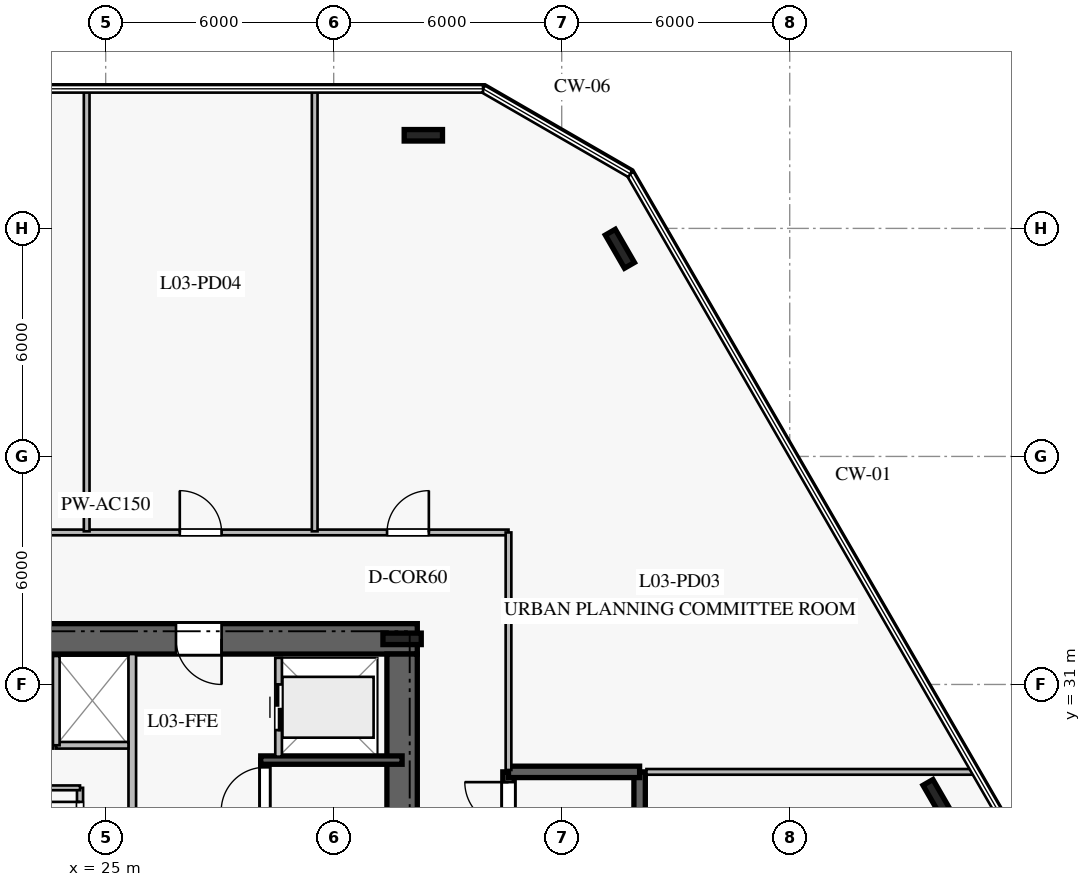
"""IFC4 building model, lengths in metres.
Left out: names, types, materials, properties, quantities, classifications, styles, units other than length and angle.
Written with IfcOpenShell. Run it as: python <this file> out.ifc"""

import sys

from ifc_helpers import new_model, si_unit, direction, frame, frame_2d, origin, origin_2d, place, context, subcontext, project, spatial, rectangle, i_section, extrude, element, fill, save


model = new_model("IFC4")
c1 = context("Model", 3, precision=1e-05, world=origin(), true_north=direction((0.0, 1.0)))
c2 = subcontext(c1, "Body", "Model", "MODEL_VIEW")
j1 = project(units=[si_unit("LENGTHUNIT", "METRE"), si_unit("PLANEANGLEUNIT", "RADIAN")], contexts=[c1])
p1 = place(None, origin())
s1 = spatial("IfcSite", under=j1, at=p1, CompositionType="ELEMENT")
p2 = place(p1, origin())
s2 = spatial("IfcBuilding", under=s1, at=p2, CompositionType="ELEMENT")
p3 = place(p2, frame((0.0, 0.0, 14.4)))
s3 = spatial("IfcBuildingStorey", under=s2, at=p3, CompositionType="ELEMENT", Elevation=14.4)
p4 = place(p3, frame((33.2, 32.2, 0.0), z_axis=(0.0, 0.0, 1.0), x_axis=(-1.0, 0.0, 0.0)))
e1 = element("IfcWall", 1, at=p4, inside=s3, PredefinedType="SHEAR", context=c2, shape_type="SweptSolid", body=[
    extrude(rectangle(XDim=16.4, YDim=0.8, at=frame_2d((8.2, 0.0))), origin(), (0.0, 0.0, 1.0), 4.3),
])
p5 = place(p4, frame((5.15, 0.0, 0.0)))
e2 = element("IfcOpeningElement", 2, at=p5, cuts=e1, PredefinedType="OPENING", context=c2, shape_type="SweptSolid", body=[
    extrude(rectangle(XDim=1.2, YDim=2.25, at=frame_2d((0.6, 1.125))), frame((0.0, 0.41, 0.0), z_axis=(0.0, -1.0, 0.0), x_axis=(1.0, 0.0, 0.0)), (0.0, 0.0, 1.0), 0.82),
])
p6 = place(p3, frame((32.8, 18.2, 0.0), z_axis=(0.0, 0.0, 1.0), x_axis=(0.0, 1.0, 0.0)))
e3 = element("IfcWall", 3, at=p6, inside=s3, PredefinedType="SHEAR", context=c2, shape_type="SweptSolid", body=[
    extrude(rectangle(XDim=13.6, YDim=0.8, at=frame_2d((6.8, 0.0))), origin(), (0.0, 0.0, 1.0), 4.3),
])
p7 = place(p3, frame((32.8, 32.2, 0.0), z_axis=(0.0, 0.0, 1.0), x_axis=(1.0, 0.0, 0.0)))
e4 = element("IfcColumn", 4, at=p7, inside=s3, PredefinedType="COLUMN", context=c2, shape_type="SweptSolid", body=[
    extrude(i_section(OverallWidth=0.302, OverallDepth=1.008, WebThickness=0.021, FlangeThickness=0.04, at=origin_2d()), origin(), (0.0, 0.0, 1.0), 4.6),
])
p8 = place(p3, frame((29.19, 21.79, 0.0), z_axis=(0.0, 0.0, 1.0), x_axis=(0.0, 1.0, 0.0)))
e5 = element("IfcWall", 5, at=p8, inside=s3, PredefinedType="SOLIDWALL", context=c2, shape_type="SweptSolid", body=[
    extrude(rectangle(XDim=7.22, YDim=0.22, at=frame_2d((3.61, 0.0))), origin(), (0.0, 0.0, 1.0), 4.3),
])
p9 = place(p8, frame((5.88, 0.0, 0.0)))
e6 = element("IfcOpeningElement", 6, at=p9, cuts=e5, PredefinedType="OPENING", context=c2, shape_type="SweptSolid", body=[
    extrude(rectangle(XDim=1.15, YDim=2.2, at=frame_2d((0.575, 1.1))), frame((0.0, 0.12, 0.0), z_axis=(0.0, -1.0, 0.0), x_axis=(1.0, 0.0, 0.0)), (0.0, 0.0, 1.0), 0.24),
])
p10 = place(p3, frame((29.08, 29.01, 0.0), z_axis=(0.0, 0.0, 1.0), x_axis=(1.0, 0.0, 0.0)))
e7 = element("IfcWall", 7, at=p10, inside=s3, PredefinedType="SOLIDWALL", context=c2, shape_type="SweptSolid", body=[
    extrude(rectangle(XDim=3.72, YDim=0.22, at=frame_2d((1.86, 0.0))), origin(), (0.0, 0.0, 1.0), 4.3),
])
p11 = place(p3, frame((35.6, 21.3, 0.0), z_axis=(0.0, 0.0, 1.0), x_axis=(0.0, 1.0, 0.0)))
e8 = element("IfcWall", 8, at=p11, inside=s3, PredefinedType="SOLIDWALL", context=c2, shape_type="SweptSolid", body=[
    extrude(rectangle(XDim=7.4, YDim=0.3, at=frame_2d((3.7, 0.0))), origin(), (0.0, 0.0, 1.0), 4.3),
])
p12 = place(p11, frame((5.98, 0.0, 0.0)))
e9 = element("IfcOpeningElement", 9, at=p12, cuts=e8, PredefinedType="OPENING", context=c2, shape_type="SweptSolid", body=[
    extrude(rectangle(XDim=1.15, YDim=2.2, at=frame_2d((0.575, 1.1))), frame((0.0, 0.16, 0.0), z_axis=(0.0, -1.0, 0.0), x_axis=(1.0, 0.0, 0.0)), (0.0, 0.0, 1.0), 0.32),
])
p13 = place(p3, frame((39.05, 21.3, 0.0), z_axis=(0.0, 0.0, 1.0), x_axis=(0.0, 1.0, 0.0)))
e10 = element("IfcWall", 10, at=p13, inside=s3, PredefinedType="SOLIDWALL", context=c2, shape_type="SweptSolid", body=[
    extrude(rectangle(XDim=7.4, YDim=0.3, at=frame_2d((3.7, 0.0))), origin(), (0.0, 0.0, 1.0), 4.3),
])
p14 = place(p3, frame((35.6, 28.7, 0.0), z_axis=(0.0, 0.0, 1.0), x_axis=(1.0, 0.0, 0.0)))
e11 = element("IfcWall", 11, at=p14, inside=s3, PredefinedType="SOLIDWALL", context=c2, shape_type="SweptSolid", body=[
    extrude(rectangle(XDim=3.45, YDim=0.3, at=frame_2d((1.725, 0.0))), origin(), (0.0, 0.0, 1.0), 4.3),
])
for number, where, z_axis, x_axis in (
    (12, (46.89, 27.986, 0.0), (0.0, 0.0, 1.0), (-0.5, 0.866, 0.0)),
    (13, (38.531, 42.464, 0.0), (0.0, 0.0, 1.0), (-0.5, 0.866, 0.0)),
    (14, (33.359, 45.45, 0.0), (0.0, 0.0, 1.0), (1.0, 0.0, 0.0)),
):
    element("IfcColumn", number, at=place(p3, frame(where, z_axis=z_axis, x_axis=x_axis)), inside=s3, PredefinedType="COLUMN", context=c2, shape_type="SweptSolid", body=[
        extrude(i_section(OverallWidth=0.302, OverallDepth=1.008, WebThickness=0.021, FlangeThickness=0.04, at=origin_2d()), origin(), (0.0, 0.0, 1.0), 4.6),
    ])
p15 = place(p3, frame((25.7, 26.65, 0.0), z_axis=(0.0, 0.0, 1.0), x_axis=(0.0, 1.0, 0.0)))
e15 = element("IfcWall", 15, at=p15, inside=s3, PredefinedType="PARTITIONING", context=c2, shape_type="SweptSolid", body=[
    extrude(rectangle(XDim=5.15, YDim=0.2, at=frame_2d((2.575, 0.0))), origin(), (0.0, 0.0, 1.0), 4.3),
])
p16 = place(p3, frame((24.325, 23.35, 0.0), z_axis=(0.0, 0.0, 1.0), x_axis=(0.0, 1.0, 0.0)))
e16 = element("IfcWall", 16, at=p16, inside=s3, PredefinedType="PLUMBINGWALL", context=c2, shape_type="SweptSolid", body=[
    extrude(rectangle(XDim=4.93, YDim=0.16, at=frame_2d((2.465, 0.0))), origin(), (0.0, 0.0, 1.0), 4.3),
])
p17 = place(p16, frame((0.375, 0.0, 0.0)))
e17 = element("IfcOpeningElement", 17, at=p17, cuts=e16, PredefinedType="OPENING", context=c2, shape_type="SweptSolid", body=[
    extrude(rectangle(XDim=0.95, YDim=2.1, at=frame_2d((0.475, 1.05))), frame((0.0, 0.09, 0.0), z_axis=(0.0, -1.0, 0.0), x_axis=(1.0, 0.0, 0.0)), (0.0, 0.0, 1.0), 0.18),
])
p18 = place(p16, frame((2.035, 0.0, 0.0)))
e18 = element("IfcOpeningElement", 18, at=p18, cuts=e16, PredefinedType="OPENING", context=c2, shape_type="SweptSolid", body=[
    extrude(rectangle(XDim=0.9, YDim=2.1, at=frame_2d((0.45, 1.05))), frame((0.0, 0.09, 0.0), z_axis=(0.0, -1.0, 0.0), x_axis=(1.0, 0.0, 0.0)), (0.0, 0.0, 1.0), 0.18),
])
p19 = place(p16, frame((3.66, 0.0, 0.0)))
e19 = element("IfcOpeningElement", 19, at=p19, cuts=e16, PredefinedType="OPENING", context=c2, shape_type="SweptSolid", body=[
    extrude(rectangle(XDim=0.9, YDim=2.1, at=frame_2d((0.45, 1.05))), frame((0.0, 0.09, 0.0), z_axis=(0.0, -1.0, 0.0), x_axis=(1.0, 0.0, 0.0)), (0.0, 0.0, 1.0), 0.18),
])
p20 = place(p3, frame((20.92, 28.28, 0.0), z_axis=(0.0, 0.0, 1.0), x_axis=(1.0, 0.0, 0.0)))
e20 = element("IfcWall", 20, at=p20, inside=s3, PredefinedType="PARTITIONING", context=c2, shape_type="SweptSolid", body=[
    extrude(rectangle(XDim=3.405, YDim=0.125, at=frame_2d((1.703, 0.0))), origin(), (0.0, 0.0, 1.0), 4.3),
])
p21 = place(p3, frame((21.725, 29.4, 0.0), z_axis=(0.0, 0.0, 1.0), x_axis=(1.0, 0.0, 0.0)))
e21 = element("IfcWall", 21, at=p21, inside=s3, PredefinedType="PARTITIONING", context=c2, shape_type="SweptSolid", body=[
    extrude(rectangle(XDim=1.9, YDim=0.175, at=frame_2d((0.95, 0.0))), origin(), (0.0, 0.0, 1.0), 4.3),
])
p22 = place(p3, frame((23.7, 29.4, 0.0), z_axis=(0.0, 0.0, 1.0), x_axis=(1.0, 0.0, 0.0)))
e22 = element("IfcWall", 22, at=p22, inside=s3, PredefinedType="PARTITIONING", context=c2, shape_type="SweptSolid", body=[
    extrude(rectangle(XDim=1.9, YDim=0.175, at=frame_2d((0.95, 0.0))), origin(), (0.0, 0.0, 1.0), 4.3),
])
p23 = place(p3, frame((23.7, 29.4, 0.0), z_axis=(0.0, 0.0, 1.0), x_axis=(0.0, 1.0, 0.0)))
e23 = element("IfcWall", 23, at=p23, inside=s3, PredefinedType="PARTITIONING", context=c2, shape_type="SweptSolid", body=[
    extrude(rectangle(XDim=2.35, YDim=0.175, at=frame_2d((1.175, 0.0))), origin(), (0.0, 0.0, 1.0), 4.3),
])
p24 = place(p3, frame((29.55, 29.1, 0.0), z_axis=(0.0, 0.0, 1.0), x_axis=(0.0, 1.0, 0.0)))
e24 = element("IfcWall", 24, at=p24, inside=s3, PredefinedType="PARTITIONING", context=c2, shape_type="SweptSolid", body=[
    extrude(rectangle(XDim=2.6, YDim=0.175, at=frame_2d((1.3, 0.0))), origin(), (0.0, 0.0, 1.0), 4.3),
])
p25 = place(p24, frame((0.7, 0.0, 0.0)))
e25 = element("IfcOpeningElement", 25, at=p25, cuts=e24, PredefinedType="OPENING", context=c2, shape_type="SweptSolid", body=[
    extrude(rectangle(XDim=1.2, YDim=2.2, at=frame_2d((0.6, 1.1))), frame((0.0, 0.098, 0.0), z_axis=(0.0, -1.0, 0.0), x_axis=(1.0, 0.0, 0.0)), (0.0, 0.0, 1.0), 0.195),
])
p26 = place(p3, frame((14.4, 35.0, 0.0), z_axis=(0.0, 0.0, 1.0), x_axis=(1.0, 0.0, 0.0)))
e26 = element("IfcWall", 26, at=p26, inside=s3, PredefinedType="PARTITIONING", context=c2, shape_type="SweptSolid", body=[
    extrude(rectangle(XDim=21.2, YDim=0.15, at=frame_2d((10.6, 0.0))), origin(), (0.0, 0.0, 1.0), 3.75),
])
p27 = place(p26, frame((2.12, 0.0, 0.0)))
e27 = element("IfcOpeningElement", 27, at=p27, cuts=e26, PredefinedType="OPENING", context=c2, shape_type="SweptSolid", body=[
    extrude(rectangle(XDim=0.95, YDim=2.1, at=frame_2d((0.475, 1.05))), frame((0.0, 0.085, 0.0), z_axis=(0.0, -1.0, 0.0), x_axis=(1.0, 0.0, 0.0)), (0.0, 0.0, 1.0), 0.17),
])
p28 = place(p26, frame((7.088, 0.0, 0.0)))
e28 = element("IfcOpeningElement", 28, at=p28, cuts=e26, PredefinedType="OPENING", context=c2, shape_type="SweptSolid", body=[
    extrude(rectangle(XDim=1.1, YDim=2.2, at=frame_2d((0.55, 1.1))), frame((0.0, 0.085, 0.0), z_axis=(0.0, -1.0, 0.0), x_axis=(1.0, 0.0, 0.0)), (0.0, 0.0, 1.0), 0.17),
])
p29 = place(p26, frame((18.004, 0.0, 0.0)))
e29 = element("IfcOpeningElement", 29, at=p29, cuts=e26, PredefinedType="OPENING", context=c2, shape_type="SweptSolid", body=[
    extrude(rectangle(XDim=1.1, YDim=2.2, at=frame_2d((0.55, 1.1))), frame((0.0, 0.085, 0.0), z_axis=(0.0, -1.0, 0.0), x_axis=(1.0, 0.0, 0.0)), (0.0, 0.0, 1.0), 0.17),
])
p30 = place(p26, frame((12.55, 0.0, 0.0)))
e30 = element("IfcOpeningElement", 30, at=p30, cuts=e26, PredefinedType="OPENING", context=c2, shape_type="SweptSolid", body=[
    extrude(rectangle(XDim=1.1, YDim=2.2, at=frame_2d((0.55, 1.1))), frame((0.0, 0.085, 0.0), z_axis=(0.0, -1.0, 0.0), x_axis=(1.0, 0.0, 0.0)), (0.0, 0.0, 1.0), 0.17),
])
p31 = place(p3, frame((35.6, 28.75, 0.0), z_axis=(0.0, 0.0, 1.0), x_axis=(0.0, 1.0, 0.0)))
e31 = element("IfcWall", 31, at=p31, inside=s3, PredefinedType="PARTITIONING", context=c2, shape_type="SweptSolid", body=[
    extrude(rectangle(XDim=6.25, YDim=0.15, at=frame_2d((3.125, 0.0))), origin(), (0.0, 0.0, 1.0), 3.75),
])
p32 = place(p3, frame((39.23, 28.7, 0.0), z_axis=(0.0, 0.0, 1.0), x_axis=(1.0, 0.0, 0.0)))
e32 = element("IfcWall", 32, at=p32, inside=s3, PredefinedType="PARTITIONING", context=c2, shape_type="SweptSolid", body=[
    extrude(rectangle(XDim=8.69, YDim=0.15, at=frame_2d((4.345, 0.0))), origin(), (0.0, 0.0, 1.0), 3.6),
])
for number, where, z_axis, x_axis in (
    (33, (24.5, 35.03, 0.0), (0.0, 0.0, 1.0), (0.0, 1.0, 0.0)),
    (34, (30.5, 35.03, 0.0), (0.0, 0.0, 1.0), (0.0, 1.0, 0.0)),
):
    element("IfcWall", number, at=place(p3, frame(where, z_axis=z_axis, x_axis=x_axis)), inside=s3, PredefinedType="PARTITIONING", context=c2, shape_type="SweptSolid", body=[
        extrude(rectangle(XDim=11.67, YDim=0.15, at=frame_2d((5.835, 0.0))), origin(), (0.0, 0.0, 1.0), 3.6),
    ])
p33 = place(p9, origin())
e35 = element("IfcDoor", 35, at=p33, inside=s3, OperationType="SINGLE_SWING_LEFT", PredefinedType="DOOR", context=c2, shape_type="SweptSolid", body=[
    extrude(rectangle(XDim=1.15, YDim=2.2, at=frame_2d((0.575, 1.1))), frame((0.0, 0.025, 0.0), z_axis=(0.0, -1.0, 0.0), x_axis=(1.0, 0.0, 0.0)), (0.0, 0.0, 1.0), 0.05),
])
fill(e6, e35)
p34 = place(p5, origin())
e36 = element("IfcDoor", 36, at=p34, inside=s3, OperationType="SINGLE_SWING_LEFT", PredefinedType="DOOR", context=c2, shape_type="SweptSolid", body=[
    extrude(rectangle(XDim=1.2, YDim=2.25, at=frame_2d((0.6, 1.125))), frame((0.0, 0.025, 0.0), z_axis=(0.0, -1.0, 0.0), x_axis=(1.0, 0.0, 0.0)), (0.0, 0.0, 1.0), 0.05),
])
fill(e2, e36)
p35 = place(p19, origin())
e37 = element("IfcDoor", 37, at=p35, inside=s3, OperationType="SINGLE_SWING_RIGHT", PredefinedType="DOOR", context=c2, shape_type="SweptSolid", body=[
    extrude(rectangle(XDim=0.9, YDim=2.1, at=frame_2d((0.45, 1.05))), frame((0.0, 0.025, 0.0), z_axis=(0.0, -1.0, 0.0), x_axis=(1.0, 0.0, 0.0)), (0.0, 0.0, 1.0), 0.05),
])
fill(e19, e37)
p36 = place(p25, origin())
e38 = element("IfcDoor", 38, at=p36, inside=s3, OperationType="DOUBLE_DOOR_SLIDING", PredefinedType="DOOR", context=c2, shape_type="SweptSolid", body=[
    extrude(rectangle(XDim=1.2, YDim=2.2, at=frame_2d((0.6, 1.1))), frame((0.0, 0.025, 0.0), z_axis=(0.0, -1.0, 0.0), x_axis=(1.0, 0.0, 0.0)), (0.0, 0.0, 1.0), 0.05),
])
fill(e25, e38)
p37 = place(p12, origin())
e39 = element("IfcDoor", 39, at=p37, inside=s3, OperationType="SINGLE_SWING_RIGHT", PredefinedType="DOOR", context=c2, shape_type="SweptSolid", body=[
    extrude(rectangle(XDim=1.15, YDim=2.2, at=frame_2d((0.575, 1.1))), frame((0.0, 0.025, 0.0), z_axis=(0.0, -1.0, 0.0), x_axis=(1.0, 0.0, 0.0)), (0.0, 0.0, 1.0), 0.05),
])
fill(e9, e39)
p38 = place(p29, origin())
e40 = element("IfcDoor", 40, at=p38, inside=s3, OperationType="SINGLE_SWING_RIGHT", PredefinedType="DOOR", context=c2, shape_type="SweptSolid", body=[
    extrude(rectangle(XDim=1.1, YDim=2.2, at=frame_2d((0.55, 1.1))), frame((0.0, 0.025, 0.0), z_axis=(0.0, -1.0, 0.0), x_axis=(1.0, 0.0, 0.0)), (0.0, 0.0, 1.0), 0.05),
])
fill(e29, e40)
p39 = place(p30, origin())
e41 = element("IfcDoor", 41, at=p39, inside=s3, OperationType="SINGLE_SWING_LEFT", PredefinedType="DOOR", context=c2, shape_type="SweptSolid", body=[
    extrude(rectangle(XDim=1.1, YDim=2.2, at=frame_2d((0.55, 1.1))), frame((0.0, 0.025, 0.0), z_axis=(0.0, -1.0, 0.0), x_axis=(1.0, 0.0, 0.0)), (0.0, 0.0, 1.0), 0.05),
])
fill(e30, e41)
save(model, sys.argv[1])
